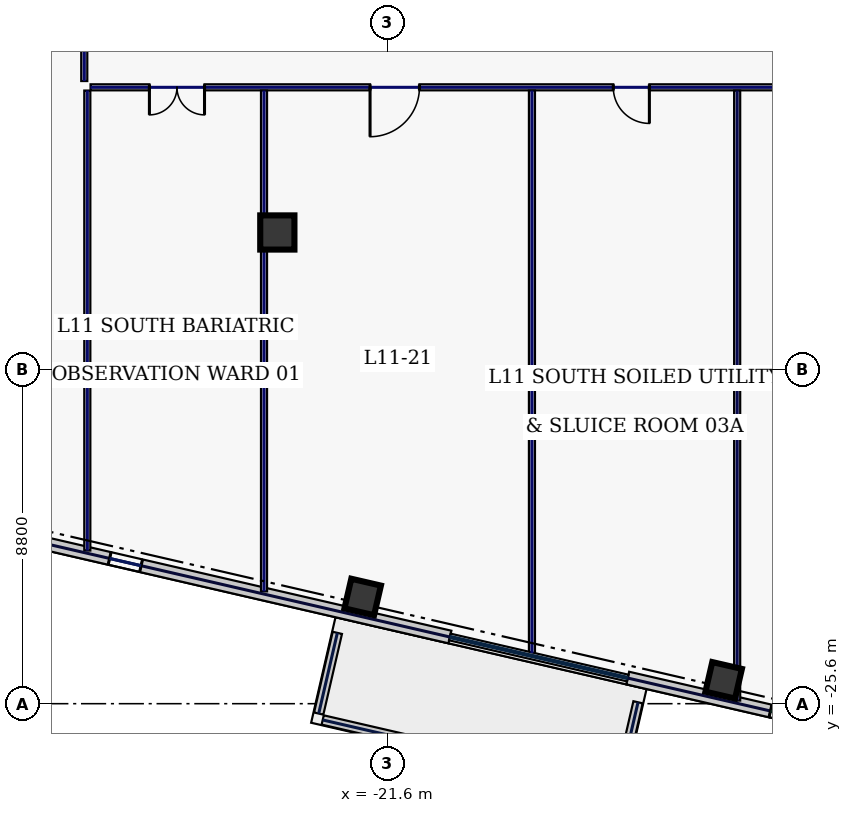
"""IFC4 building model, lengths in metres.
Left out: names, types, materials, properties, quantities, classifications, styles, units other than length and angle.
Written with IfcOpenShell. Run it as: python <this file> out.ifc"""

import sys

from ifc_helpers import new_model, si_unit, direction, frame, frame_2d, origin, origin_2d, place, context, subcontext, project, spatial, rectangle, hollow_rectangle, extrude, element, fill, save


model = new_model("IFC4")
c1 = context("Model", 3, precision=1e-05, world=origin(), true_north=direction((0.0, 1.0)))
c2 = subcontext(c1, "Body", "Model", "MODEL_VIEW")
j1 = project(units=[si_unit("LENGTHUNIT", "METRE"), si_unit("PLANEANGLEUNIT", "RADIAN")], contexts=[c1])
p1 = place(None, origin())
s1 = spatial("IfcSite", under=j1, at=p1, CompositionType="ELEMENT")
p2 = place(p1, origin())
s2 = spatial("IfcBuilding", under=s1, at=p2, CompositionType="ELEMENT")
p3 = place(p2, frame((0.0, 0.0, 55.4)))
s3 = spatial("IfcBuildingStorey", under=s2, at=p3, CompositionType="ELEMENT", Elevation=55.4)
p4 = place(p3, frame((-24.5, -13.2, 0.0), z_axis=(0.0, 0.0, 1.0), x_axis=(1.0, 0.0, 0.0)))
e1 = element("IfcColumn", 1, at=p4, inside=s3, PredefinedType="COLUMN", context=c2, shape_type="SweptSolid", body=[
    extrude(hollow_rectangle(XDim=0.9, YDim=0.9, WallThickness=0.04, at=origin_2d()), origin(), (0.0, 0.0, 1.0), 3.74),
])
for number, where, z_axis, x_axis in (
    (2, (-22.254, -22.792, 0.0), (0.0, 0.0, 1.0), (0.974, -0.225, 0.0)),
    (3, (-12.755, -24.985, 0.0), (0.0, 0.0, 1.0), (0.974, -0.225, 0.0)),
):
    element("IfcColumn", number, at=place(p3, frame(where, z_axis=z_axis, x_axis=x_axis)), inside=s3, PredefinedType="COLUMN", context=c2, shape_type="SweptSolid", body=[
        extrude(hollow_rectangle(XDim=0.8, YDim=0.8, WallThickness=0.036, at=origin_2d()), origin(), (0.0, 0.0, 1.0), 3.74),
    ])
p5 = place(p3, frame((-22.92, -23.736, 0.0), z_axis=(0.0, 0.0, 1.0), x_axis=(-0.224998554752, -0.974359097232, 0.0)))
e4 = element("IfcWall", 4, at=p5, inside=s3, PredefinedType="PARAPET", context=c2, shape_type="SweptSolid", body=[
    extrude(rectangle(XDim=2.18, YDim=0.25, at=frame_2d((1.09, 0.0))), origin(), (0.0, 0.0, 1.0), 1.15),
])
p6 = place(p3, frame((-23.306, -26.028, 0.0), z_axis=(0.0, 0.0, 1.0), x_axis=(0.974367572223, -0.224961850546, 0.0)))
e5 = element("IfcWall", 5, at=p6, inside=s3, PredefinedType="PARAPET", context=c2, shape_type="SweptSolid", body=[
    extrude(rectangle(XDim=7.84, YDim=0.25, at=frame_2d((3.92, 0.0))), origin(), (0.0, 0.0, 1.0), 1.15),
])
p7 = place(p3, frame((-15.499, -27.687, 0.0), z_axis=(0.0, 0.0, 1.0), x_axis=(0.224998554752, 0.974359097232, 0.0)))
e6 = element("IfcWall", 6, at=p7, inside=s3, PredefinedType="PARAPET", context=c2, shape_type="SweptSolid", body=[
    extrude(rectangle(XDim=2.18, YDim=0.25, at=frame_2d((1.09, 0.0))), origin(), (0.0, 0.0, 1.0), 1.15),
])
p8 = place(p3, frame((-42.029, -18.75, 0.0), z_axis=(0.0, 0.0, 1.0), x_axis=(0.97436993772, -0.224951604723, 0.0)))
e7 = element("IfcWall", 7, at=p8, inside=s3, PredefinedType="STANDARD", context=c2, shape_type="SweptSolid", body=[
    extrude(rectangle(XDim=22.651, YDim=0.34, at=frame_2d((11.326, 0.0))), origin(), (0.0, 0.0, 1.0), 3.74),
])
p9 = place(p8, frame((2.062, 0.0, 0.72)))
e8 = element("IfcOpeningElement", 8, at=p9, cuts=e7, PredefinedType="OPENING", context=c2, shape_type="SweptSolid", body=[
    extrude(rectangle(XDim=2.5, YDim=2.15, at=frame_2d((1.25, 1.075))), frame((0.0, 0.18, 0.0), z_axis=(0.0, -1.0, 0.0), x_axis=(1.0, 0.0, 0.0)), (0.0, 0.0, 1.0), 0.36),
])
p10 = place(p8, frame((6.546, 0.0, 0.72)))
e9 = element("IfcOpeningElement", 9, at=p10, cuts=e7, PredefinedType="OPENING", context=c2, shape_type="SweptSolid", body=[
    extrude(rectangle(XDim=2.5, YDim=2.15, at=frame_2d((1.25, 1.075))), frame((0.0, 0.18, 0.0), z_axis=(0.0, -1.0, 0.0), x_axis=(1.0, 0.0, 0.0)), (0.0, 0.0, 1.0), 0.36),
])
p11 = place(p8, frame((13.461, 0.0, 0.72)))
e10 = element("IfcOpeningElement", 10, at=p11, cuts=e7, PredefinedType="OPENING", context=c2, shape_type="SweptSolid", body=[
    extrude(rectangle(XDim=0.85, YDim=1.85, at=frame_2d((0.425, 0.925))), frame((0.0, 0.18, 0.0), z_axis=(0.0, -1.0, 0.0), x_axis=(1.0, 0.0, 0.0)), (0.0, 0.0, 1.0), 0.36),
])
p12 = place(p3, frame((-15.281, -24.925, 0.0), z_axis=(0.0, 0.0, 1.0), x_axis=(0.974370193991, -0.22495049469, 0.0)))
e11 = element("IfcWall", 11, at=p12, inside=s3, PredefinedType="STANDARD", context=c2, shape_type="SweptSolid", body=[
    extrude(rectangle(XDim=14.697, YDim=0.34, at=frame_2d((7.349, 0.0))), origin(), (0.0, 0.0, 1.0), 3.74),
])
p13 = place(p12, frame((3.856, 0.0, 0.72)))
e12 = element("IfcOpeningElement", 12, at=p13, cuts=e11, PredefinedType="OPENING", context=c2, shape_type="SweptSolid", body=[
    extrude(rectangle(XDim=2.5, YDim=2.15, at=frame_2d((1.25, 1.075))), frame((0.0, 0.18, 0.0), z_axis=(0.0, -1.0, 0.0), x_axis=(1.0, 0.0, 0.0)), (0.0, 0.0, 1.0), 0.36),
])
p14 = place(p12, frame((8.341, 0.0, 0.72)))
e13 = element("IfcOpeningElement", 13, at=p14, cuts=e11, PredefinedType="OPENING", context=c2, shape_type="SweptSolid", body=[
    extrude(rectangle(XDim=2.5, YDim=2.15, at=frame_2d((1.25, 1.075))), frame((0.0, 0.18, 0.0), z_axis=(0.0, -1.0, 0.0), x_axis=(1.0, 0.0, 0.0)), (0.0, 0.0, 1.0), 0.36),
])
p15 = place(p3, frame((-29.58, -9.215, 0.0), z_axis=(0.0, 0.0, 1.0), x_axis=(0.0, 1.0, 0.0)))
e14 = element("IfcWall", 14, at=p15, inside=s3, PredefinedType="PARTITIONING", context=c2, shape_type="SweptSolid", body=[
    extrude(rectangle(XDim=18.63, YDim=0.16, at=frame_2d((9.315, 0.0))), origin(), (0.0, 0.0, 1.0), 3.74),
])
p16 = place(p15, frame((1.769, 0.0, 0.0)))
e15 = element("IfcOpeningElement", 15, at=p16, cuts=e14, PredefinedType="OPENING", context=c2, shape_type="SweptSolid", body=[
    extrude(rectangle(XDim=0.95, YDim=2.2, at=frame_2d((0.475, 1.1))), frame((0.0, 0.09, 0.0), z_axis=(0.0, -1.0, 0.0), x_axis=(1.0, 0.0, 0.0)), (0.0, 0.0, 1.0), 0.18),
])
p17 = place(p15, frame((5.6, 0.0, 0.0)))
e16 = element("IfcOpeningElement", 16, at=p17, cuts=e14, PredefinedType="OPENING", context=c2, shape_type="SweptSolid", body=[
    extrude(rectangle(XDim=0.95, YDim=2.2, at=frame_2d((0.475, 1.1))), frame((0.0, 0.09, 0.0), z_axis=(0.0, -1.0, 0.0), x_axis=(1.0, 0.0, 0.0)), (0.0, 0.0, 1.0), 0.18),
])
p18 = place(p15, frame((10.8, 0.0, 0.0)))
e17 = element("IfcOpeningElement", 17, at=p18, cuts=e14, PredefinedType="OPENING", context=c2, shape_type="SweptSolid", body=[
    extrude(rectangle(XDim=0.95, YDim=2.2, at=frame_2d((0.475, 1.1))), frame((0.0, 0.09, 0.0), z_axis=(0.0, -1.0, 0.0), x_axis=(1.0, 0.0, 0.0)), (0.0, 0.0, 1.0), 0.18),
])
p19 = place(p15, frame((15.981, 0.0, 0.0)))
e18 = element("IfcOpeningElement", 18, at=p19, cuts=e14, PredefinedType="OPENING", context=c2, shape_type="SweptSolid", body=[
    extrude(rectangle(XDim=0.95, YDim=2.2, at=frame_2d((0.475, 1.1))), frame((0.0, 0.09, 0.0), z_axis=(0.0, -1.0, 0.0), x_axis=(1.0, 0.0, 0.0)), (0.0, 0.0, 1.0), 0.18),
])
p20 = place(p3, frame((29.415, -9.38, 0.0), z_axis=(0.0, 0.0, 1.0), x_axis=(-1.0, 0.0, 0.0)))
e19 = element("IfcWall", 19, at=p20, inside=s3, PredefinedType="PARTITIONING", context=c2, shape_type="SweptSolid", body=[
    extrude(rectangle(XDim=58.83, YDim=0.16, at=frame_2d((29.415, 0.0))), origin(), (0.0, 0.0, 1.0), 3.74),
])
p21 = place(p20, frame((55.831, 0.0, 0.0)))
e20 = element("IfcOpeningElement", 20, at=p21, cuts=e19, PredefinedType="OPENING", context=c2, shape_type="SweptSolid", body=[
    extrude(rectangle(XDim=1.45, YDim=2.2, at=frame_2d((0.725, 1.1))), frame((0.0, 0.09, 0.0), z_axis=(0.0, -1.0, 0.0), x_axis=(1.0, 0.0, 0.0)), (0.0, 0.0, 1.0), 0.18),
])
p22 = place(p20, frame((50.175, 0.0, 0.0)))
e21 = element("IfcOpeningElement", 21, at=p22, cuts=e19, PredefinedType="OPENING", context=c2, shape_type="SweptSolid", body=[
    extrude(rectangle(XDim=1.3, YDim=2.2, at=frame_2d((0.65, 1.1))), frame((0.0, 0.09, 0.0), z_axis=(0.0, -1.0, 0.0), x_axis=(1.0, 0.0, 0.0)), (0.0, 0.0, 1.0), 0.18),
])
p23 = place(p20, frame((44.125, 0.0, 0.0)))
e22 = element("IfcOpeningElement", 22, at=p23, cuts=e19, PredefinedType="OPENING", context=c2, shape_type="SweptSolid", body=[
    extrude(rectangle(XDim=0.95, YDim=2.2, at=frame_2d((0.475, 1.1))), frame((0.0, 0.09, 0.0), z_axis=(0.0, -1.0, 0.0), x_axis=(1.0, 0.0, 0.0)), (0.0, 0.0, 1.0), 0.18),
])
p24 = place(p20, frame((39.175, 0.0, 0.0)))
e23 = element("IfcOpeningElement", 23, at=p24, cuts=e19, PredefinedType="OPENING", context=c2, shape_type="SweptSolid", body=[
    extrude(rectangle(XDim=0.95, YDim=2.2, at=frame_2d((0.475, 1.1))), frame((0.0, 0.09, 0.0), z_axis=(0.0, -1.0, 0.0), x_axis=(1.0, 0.0, 0.0)), (0.0, 0.0, 1.0), 0.18),
])
p25 = place(p20, frame((34.0, 0.0, 0.0)))
e24 = element("IfcOpeningElement", 24, at=p25, cuts=e19, PredefinedType="OPENING", context=c2, shape_type="SweptSolid", body=[
    extrude(rectangle(XDim=0.95, YDim=2.2, at=frame_2d((0.475, 1.1))), frame((0.0, 0.09, 0.0), z_axis=(0.0, -1.0, 0.0), x_axis=(1.0, 0.0, 0.0)), (0.0, 0.0, 1.0), 0.18),
])
p26 = place(p20, frame((28.6, 0.0, 0.0)))
e25 = element("IfcOpeningElement", 25, at=p26, cuts=e19, PredefinedType="OPENING", context=c2, shape_type="SweptSolid", body=[
    extrude(rectangle(XDim=1.05, YDim=2.2, at=frame_2d((0.525, 1.1))), frame((0.0, 0.09, 0.0), z_axis=(0.0, -1.0, 0.0), x_axis=(1.0, 0.0, 0.0)), (0.0, 0.0, 1.0), 0.18),
])
p27 = place(p20, frame((23.165, 0.0, 0.0)))
e26 = element("IfcOpeningElement", 26, at=p27, cuts=e19, PredefinedType="OPENING", context=c2, shape_type="SweptSolid", body=[
    extrude(rectangle(XDim=0.95, YDim=2.2, at=frame_2d((0.475, 1.1))), frame((0.0, 0.09, 0.0), z_axis=(0.0, -1.0, 0.0), x_axis=(1.0, 0.0, 0.0)), (0.0, 0.0, 1.0), 0.18),
])
p28 = place(p20, frame((18.015, 0.0, 0.0)))
e27 = element("IfcOpeningElement", 27, at=p28, cuts=e19, PredefinedType="OPENING", context=c2, shape_type="SweptSolid", body=[
    extrude(rectangle(XDim=0.95, YDim=2.2, at=frame_2d((0.475, 1.1))), frame((0.0, 0.09, 0.0), z_axis=(0.0, -1.0, 0.0), x_axis=(1.0, 0.0, 0.0)), (0.0, 0.0, 1.0), 0.18),
])
p29 = place(p20, frame((13.275, 0.0, 0.0)))
e28 = element("IfcOpeningElement", 28, at=p29, cuts=e19, PredefinedType="OPENING", context=c2, shape_type="SweptSolid", body=[
    extrude(rectangle(XDim=1.3, YDim=2.2, at=frame_2d((0.65, 1.1))), frame((0.0, 0.09, 0.0), z_axis=(0.0, -1.0, 0.0), x_axis=(1.0, 0.0, 0.0)), (0.0, 0.0, 1.0), 0.18),
])
p30 = place(p20, frame((8.975, 0.0, 0.0)))
e29 = element("IfcOpeningElement", 29, at=p30, cuts=e19, PredefinedType="OPENING", context=c2, shape_type="SweptSolid", body=[
    extrude(rectangle(XDim=1.3, YDim=2.2, at=frame_2d((0.65, 1.1))), frame((0.0, 0.09, 0.0), z_axis=(0.0, -1.0, 0.0), x_axis=(1.0, 0.0, 0.0)), (0.0, 0.0, 1.0), 0.18),
])
p31 = place(p20, frame((4.9, 0.0, 0.0)))
e30 = element("IfcOpeningElement", 30, at=p31, cuts=e19, PredefinedType="OPENING", context=c2, shape_type="SweptSolid", body=[
    extrude(rectangle(XDim=1.3, YDim=2.2, at=frame_2d((0.65, 1.1))), frame((0.0, 0.09, 0.0), z_axis=(0.0, -1.0, 0.0), x_axis=(1.0, 0.0, 0.0)), (0.0, 0.0, 1.0), 0.18),
])
p32 = place(p20, frame((1.419, 0.0, 0.0)))
e31 = element("IfcOpeningElement", 31, at=p32, cuts=e19, PredefinedType="OPENING", context=c2, shape_type="SweptSolid", body=[
    extrude(rectangle(XDim=0.95, YDim=2.2, at=frame_2d((0.475, 1.1))), frame((0.0, 0.09, 0.0), z_axis=(0.0, -1.0, 0.0), x_axis=(1.0, 0.0, 0.0)), (0.0, 0.0, 1.0), 0.18),
])
p33 = place(p3, frame((-29.5, -21.571, 0.0), z_axis=(0.0, 0.0, 1.0), x_axis=(0.0, 1.0, 0.0)))
e32 = element("IfcWall", 32, at=p33, inside=s3, PredefinedType="PARTITIONING", context=c2, shape_type="SweptSolid", body=[
    extrude(rectangle(XDim=12.105, YDim=0.16, at=frame_2d((6.053, 0.0))), origin(), (0.0, 0.0, 1.0), 3.74),
])
p34 = place(p3, frame((-24.85, -22.644, 0.0), z_axis=(0.0, 0.0, 1.0), x_axis=(0.0, 1.0, 0.0)))
e33 = element("IfcWall", 33, at=p34, inside=s3, PredefinedType="PARTITIONING", context=c2, shape_type="SweptSolid", body=[
    extrude(rectangle(XDim=13.179, YDim=0.16, at=frame_2d((6.589, 0.0))), origin(), (0.0, 0.0, 1.0), 3.74),
])
p35 = place(p3, frame((-17.8, -24.272, 0.0), z_axis=(0.0, 0.0, 1.0), x_axis=(0.0, 1.0, 0.0)))
e34 = element("IfcWall", 34, at=p35, inside=s3, PredefinedType="PARTITIONING", context=c2, shape_type="SweptSolid", body=[
    extrude(rectangle(XDim=14.807, YDim=0.16, at=frame_2d((7.403, 0.0))), origin(), (0.0, 0.0, 1.0), 3.74),
])
p36 = place(p3, frame((-12.4, -25.518, 0.0), z_axis=(0.0, 0.0, 1.0), x_axis=(0.0, 1.0, 0.0)))
e35 = element("IfcWall", 35, at=p36, inside=s3, PredefinedType="PARTITIONING", context=c2, shape_type="SweptSolid", body=[
    extrude(rectangle(XDim=16.053, YDim=0.16, at=frame_2d((8.027, 0.0))), origin(), (0.0, 0.0, 1.0), 3.165),
])
p37 = place(p11, origin())
e36 = element("IfcWindow", 36, at=p37, inside=s3, PartitioningType="SINGLE_PANEL", PredefinedType="WINDOW", context=c2, shape_type="SweptSolid", body=[
    extrude(rectangle(XDim=0.85, YDim=1.85, at=frame_2d((0.425, 0.925))), frame((0.0, 0.03, 0.0), z_axis=(0.0, -1.0, 0.0), x_axis=(1.0, 0.0, 0.0)), (0.0, 0.0, 1.0), 0.06),
])
fill(e10, e36)
p38 = place(p13, origin())
e37 = element("IfcWindow", 37, at=p38, inside=s3, PartitioningType="SINGLE_PANEL", PredefinedType="WINDOW", context=c2, shape_type="SweptSolid", body=[
    extrude(rectangle(XDim=2.5, YDim=2.15, at=frame_2d((1.25, 1.075))), frame((0.0, 0.03, 0.0), z_axis=(0.0, -1.0, 0.0), x_axis=(1.0, 0.0, 0.0)), (0.0, 0.0, 1.0), 0.06),
])
fill(e12, e37)
p39 = place(p21, origin())
e38 = element("IfcDoor", 38, at=p39, inside=s3, OperationType="DOUBLE_SWING_LEFT", PredefinedType="DOOR", context=c2, shape_type="SweptSolid", body=[
    extrude(rectangle(XDim=1.45, YDim=2.2, at=frame_2d((0.725, 1.1))), frame((0.0, 0.025, 0.0), z_axis=(0.0, -1.0, 0.0), x_axis=(1.0, 0.0, 0.0)), (0.0, 0.0, 1.0), 0.05),
])
fill(e20, e38)
p40 = place(p22, origin())
e39 = element("IfcDoor", 39, at=p40, inside=s3, OperationType="SINGLE_SWING_RIGHT", PredefinedType="DOOR", context=c2, shape_type="SweptSolid", body=[
    extrude(rectangle(XDim=1.3, YDim=2.2, at=frame_2d((0.65, 1.1))), frame((0.0, 0.025, 0.0), z_axis=(0.0, -1.0, 0.0), x_axis=(1.0, 0.0, 0.0)), (0.0, 0.0, 1.0), 0.05),
])
fill(e21, e39)
p41 = place(p23, origin())
e40 = element("IfcDoor", 40, at=p41, inside=s3, OperationType="SINGLE_SWING_LEFT", PredefinedType="DOOR", context=c2, shape_type="SweptSolid", body=[
    extrude(rectangle(XDim=0.95, YDim=2.2, at=frame_2d((0.475, 1.1))), frame((0.0, 0.025, 0.0), z_axis=(0.0, -1.0, 0.0), x_axis=(1.0, 0.0, 0.0)), (0.0, 0.0, 1.0), 0.05),
])
fill(e22, e40)
save(model, sys.argv[1])
